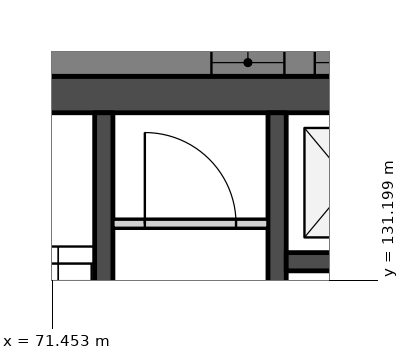
"""IFC4 building model, lengths in metres.
Left out: names, types, materials, properties, quantities, classifications, styles, units other than length and angle.
Written with IfcOpenShell. Run it as: python <this file> out.ifc"""

import sys

from ifc_helpers import new_model, si_unit, direction, frame, frame_2d, origin, place, context, subcontext, project, spatial, polyline, rectangle, outline, extrude, element, fill, save


model = new_model("IFC4")
c1 = context("Model", 3, precision=1e-05, world=origin(), true_north=direction((0.0, 1.0)))
c2 = subcontext(c1, "Body", "Model", "MODEL_VIEW")
j1 = project(units=[si_unit("LENGTHUNIT", "METRE"), si_unit("PLANEANGLEUNIT", "RADIAN")], contexts=[c1])
p1 = place(None, origin())
s1 = spatial("IfcSite", under=j1, at=p1, CompositionType="ELEMENT")
p2 = place(p1, origin())
s2 = spatial("IfcBuilding", under=s1, at=p2, CompositionType="ELEMENT")
p3 = place(p2, frame((0.0, 0.0, 38.5)))
s3 = spatial("IfcBuildingStorey", under=s2, at=p3, CompositionType="ELEMENT", Elevation=38.5)
p4 = place(p3, frame((66.0, 134.25, 0.0), z_axis=(0.0, 0.0, 1.0), x_axis=(1.0, 0.0, 0.0)))
e1 = element("IfcWall", 1, at=p4, inside=s3, PredefinedType="SOLIDWALL", context=c2, shape_type="SweptSolid", body=[
    extrude(rectangle(XDim=28.0, YDim=0.6, at=frame_2d((14.0, 0.0))), origin(), (0.0, 0.0, 1.0), 3.35),
])
p5 = place(p3, frame((72.3, 133.95, 0.0), z_axis=(0.0, 0.0, 1.0), x_axis=(0.0, -1.0, 0.0)))
e2 = element("IfcWall", 2, at=p5, inside=s3, PredefinedType="SOLIDWALL", context=c2, shape_type="SweptSolid", body=[
    extrude(rectangle(XDim=11.7, YDim=0.3, at=frame_2d((5.85, 0.0))), origin(), (0.0, 0.0, 1.0), 3.35),
])
p6 = place(p5, frame((6.95, 0.0, 0.0)))
e3 = element("IfcOpeningElement", 3, at=p6, cuts=e2, PredefinedType="OPENING", context=c2, shape_type="SweptSolid", body=[
    extrude(rectangle(XDim=1.1, YDim=2.1, at=frame_2d((0.55, 1.05))), frame((0.0, 0.16, 0.0), z_axis=(0.0, -1.0, 0.0), x_axis=(1.0, 0.0, 0.0)), (0.0, 0.0, 1.0), 0.32),
])
p7 = place(p5, frame((9.35, 0.0, 0.0)))
e4 = element("IfcOpeningElement", 4, at=p7, cuts=e2, PredefinedType="OPENING", context=c2, shape_type="SweptSolid", body=[
    extrude(rectangle(XDim=0.9, YDim=2.1, at=frame_2d((0.45, 1.05))), frame((0.0, 0.16, 0.0), z_axis=(0.0, -1.0, 0.0), x_axis=(1.0, 0.0, 0.0)), (0.0, 0.0, 1.0), 0.32),
])
p8 = place(p5, frame((5.1, 0.0, 0.0)))
e5 = element("IfcOpeningElement", 5, at=p8, cuts=e2, PredefinedType="OPENING", context=c2, shape_type="SweptSolid", body=[
    extrude(rectangle(XDim=1.0, YDim=2.1, at=frame_2d((0.5, 1.05))), frame((0.0, 0.16, 0.0), z_axis=(0.0, -1.0, 0.0), x_axis=(1.0, 0.0, 0.0)), (0.0, 0.0, 1.0), 0.32),
])
p9 = place(p3, frame((72.45, 132.125, 0.0), z_axis=(0.0, 0.0, 1.0), x_axis=(1.0, 0.0, 0.0)))
e6 = element("IfcWall", 6, at=p9, inside=s3, PredefinedType="PARTITIONING", context=c2, shape_type="SweptSolid", body=[
    extrude(rectangle(XDim=2.55, YDim=0.15, at=frame_2d((1.275, 0.0))), origin(), (0.0, 0.0, 1.0), 3.35),
])
p10 = place(p9, frame((0.525, 0.0, 0.0)))
e7 = element("IfcOpeningElement", 7, at=p10, cuts=e6, PredefinedType="OPENING", context=c2, shape_type="SweptSolid", body=[
    extrude(rectangle(XDim=1.5, YDim=2.1, at=frame_2d((0.75, 1.05))), frame((0.0, 0.085, 0.0), z_axis=(0.0, -1.0, 0.0), x_axis=(1.0, 0.0, 0.0)), (0.0, 0.0, 1.0), 0.17),
])
p11 = place(p3, frame((75.15, 133.95, 0.0), z_axis=(0.0, 0.0, 1.0), x_axis=(0.0, -1.0, 0.0)))
e8 = element("IfcWall", 8, at=p11, inside=s3, PredefinedType="SOLIDWALL", context=c2, shape_type="SweptSolid", body=[
    extrude(rectangle(XDim=11.7, YDim=0.3, at=frame_2d((5.85, 0.0))), origin(), (0.0, 0.0, 1.0), 3.35),
])
p12 = place(p3, frame((75.3, 131.5, 0.0), z_axis=(0.0, 0.0, 1.0), x_axis=(1.0, 0.0, 0.0)))
e9 = element("IfcWall", 9, at=p12, inside=s3, PredefinedType="SOLIDWALL", context=c2, shape_type="SweptSolid", body=[
    extrude(rectangle(XDim=2.1, YDim=0.3, at=frame_2d((1.05, 0.0))), origin(), (0.0, 0.0, 1.0), 3.35),
])
p13 = place(p3, frame((102.4, 134.775, -0.15), z_axis=(0.0, 0.0, 1.0), x_axis=(-1.0, 0.0, 0.0)))
e10 = element("IfcWall", 10, at=p13, inside=s3, PredefinedType="SOLIDWALL", context=c2, shape_type="SweptSolid", body=[
    extrude(outline(polyline([(44.8, 0.0), (44.8, 3.5), (0.0, 3.5), (0.0, 0.0), (44.8, 0.0)])), frame((0.0, 0.225, 0.0), z_axis=(0.0, -1.0, 0.0), x_axis=(1.0, 0.0, 0.0)), (0.0, 0.0, 1.0), 0.45),
])
p14 = place(p13, frame((0.722, 0.0, 1.05)))
e11 = element("IfcOpeningElement", 11, at=p14, cuts=e10, PredefinedType="OPENING", context=c2, shape_type="SweptSolid", body=[
    extrude(rectangle(XDim=1.2, YDim=1.5, at=frame_2d((0.6, 0.75))), frame((0.0, 0.235, 0.0), z_axis=(0.0, -1.0, 0.0), x_axis=(1.0, 0.0, 0.0)), (0.0, 0.0, 1.0), 0.47),
])
p15 = place(p13, frame((7.51, 0.0, 1.05)))
e12 = element("IfcOpeningElement", 12, at=p15, cuts=e10, PredefinedType="OPENING", context=c2, shape_type="SweptSolid", body=[
    extrude(rectangle(XDim=1.2, YDim=1.5, at=frame_2d((0.6, 0.75))), frame((0.0, 0.235, 0.0), z_axis=(0.0, -1.0, 0.0), x_axis=(1.0, 0.0, 0.0)), (0.0, 0.0, 1.0), 0.47),
])
p16 = place(p13, frame((9.21, 0.0, 1.05)))
e13 = element("IfcOpeningElement", 13, at=p16, cuts=e10, PredefinedType="OPENING", context=c2, shape_type="SweptSolid", body=[
    extrude(rectangle(XDim=1.2, YDim=1.5, at=frame_2d((0.6, 0.75))), frame((0.0, 0.235, 0.0), z_axis=(0.0, -1.0, 0.0), x_axis=(1.0, 0.0, 0.0)), (0.0, 0.0, 1.0), 0.47),
])
p17 = place(p13, frame((16.47, 0.0, 1.05)))
e14 = element("IfcOpeningElement", 14, at=p17, cuts=e10, PredefinedType="OPENING", context=c2, shape_type="SweptSolid", body=[
    extrude(rectangle(XDim=1.2, YDim=1.5, at=frame_2d((0.6, 0.75))), frame((0.0, 0.235, 0.0), z_axis=(0.0, -1.0, 0.0), x_axis=(1.0, 0.0, 0.0)), (0.0, 0.0, 1.0), 0.47),
])
p18 = place(p13, frame((18.17, 0.0, 1.05)))
e15 = element("IfcOpeningElement", 15, at=p18, cuts=e10, PredefinedType="OPENING", context=c2, shape_type="SweptSolid", body=[
    extrude(rectangle(XDim=1.2, YDim=1.5, at=frame_2d((0.6, 0.75))), frame((0.0, 0.235, 0.0), z_axis=(0.0, -1.0, 0.0), x_axis=(1.0, 0.0, 0.0)), (0.0, 0.0, 1.0), 0.47),
])
p19 = place(p13, frame((25.43, 0.0, 1.05)))
e16 = element("IfcOpeningElement", 16, at=p19, cuts=e10, PredefinedType="OPENING", context=c2, shape_type="SweptSolid", body=[
    extrude(rectangle(XDim=1.2, YDim=1.5, at=frame_2d((0.6, 0.75))), frame((0.0, 0.235, 0.0), z_axis=(0.0, -1.0, 0.0), x_axis=(1.0, 0.0, 0.0)), (0.0, 0.0, 1.0), 0.47),
])
p20 = place(p13, frame((27.13, 0.0, 1.05)))
e17 = element("IfcOpeningElement", 17, at=p20, cuts=e10, PredefinedType="OPENING", context=c2, shape_type="SweptSolid", body=[
    extrude(rectangle(XDim=1.2, YDim=1.5, at=frame_2d((0.6, 0.75))), frame((0.0, 0.235, 0.0), z_axis=(0.0, -1.0, 0.0), x_axis=(1.0, 0.0, 0.0)), (0.0, 0.0, 1.0), 0.47),
])
p21 = place(p13, frame((34.39, 0.0, 1.05)))
e18 = element("IfcOpeningElement", 18, at=p21, cuts=e10, PredefinedType="OPENING", context=c2, shape_type="SweptSolid", body=[
    extrude(rectangle(XDim=1.2, YDim=1.5, at=frame_2d((0.6, 0.75))), frame((0.0, 0.235, 0.0), z_axis=(0.0, -1.0, 0.0), x_axis=(1.0, 0.0, 0.0)), (0.0, 0.0, 1.0), 0.47),
])
p22 = place(p13, frame((36.09, 0.0, 1.05)))
e19 = element("IfcOpeningElement", 19, at=p22, cuts=e10, PredefinedType="OPENING", context=c2, shape_type="SweptSolid", body=[
    extrude(rectangle(XDim=1.2, YDim=1.5, at=frame_2d((0.6, 0.75))), frame((0.0, 0.235, 0.0), z_axis=(0.0, -1.0, 0.0), x_axis=(1.0, 0.0, 0.0)), (0.0, 0.0, 1.0), 0.47),
])
p23 = place(p13, frame((42.878, 0.0, 1.05)))
e20 = element("IfcOpeningElement", 20, at=p23, cuts=e10, PredefinedType="OPENING", context=c2, shape_type="SweptSolid", body=[
    extrude(rectangle(XDim=1.2, YDim=1.5, at=frame_2d((0.6, 0.75))), frame((0.0, 0.235, 0.0), z_axis=(0.0, -1.0, 0.0), x_axis=(1.0, 0.0, 0.0)), (0.0, 0.0, 1.0), 0.47),
])
p24 = place(p10, origin())
e21 = element("IfcDoor", 21, at=p24, inside=s3, OperationType="DOUBLE_DOOR_DOUBLE_SWING", PredefinedType="DOOR", context=c2, shape_type="SweptSolid", body=[
    extrude(rectangle(XDim=1.5, YDim=2.1, at=frame_2d((0.75, 1.05))), frame((0.0, 0.025, 0.0), z_axis=(0.0, -1.0, 0.0), x_axis=(1.0, 0.0, 0.0)), (0.0, 0.0, 1.0), 0.05),
])
fill(e7, e21)
p25 = place(p19, origin())
e22 = element("IfcWindow", 22, at=p25, inside=s3, PartitioningType="SINGLE_PANEL", PredefinedType="WINDOW", context=c2, shape_type="SweptSolid", body=[
    extrude(rectangle(XDim=1.2, YDim=1.5, at=frame_2d((0.6, 0.75))), frame((0.0, 0.03, 0.0), z_axis=(0.0, -1.0, 0.0), x_axis=(1.0, 0.0, 0.0)), (0.0, 0.0, 1.0), 0.06),
])
fill(e16, e22)
p26 = place(p20, origin())
e23 = element("IfcWindow", 23, at=p26, inside=s3, PartitioningType="SINGLE_PANEL", PredefinedType="WINDOW", context=c2, shape_type="SweptSolid", body=[
    extrude(rectangle(XDim=1.2, YDim=1.5, at=frame_2d((0.6, 0.75))), frame((0.0, 0.03, 0.0), z_axis=(0.0, -1.0, 0.0), x_axis=(1.0, 0.0, 0.0)), (0.0, 0.0, 1.0), 0.06),
])
fill(e17, e23)
save(model, sys.argv[1])
